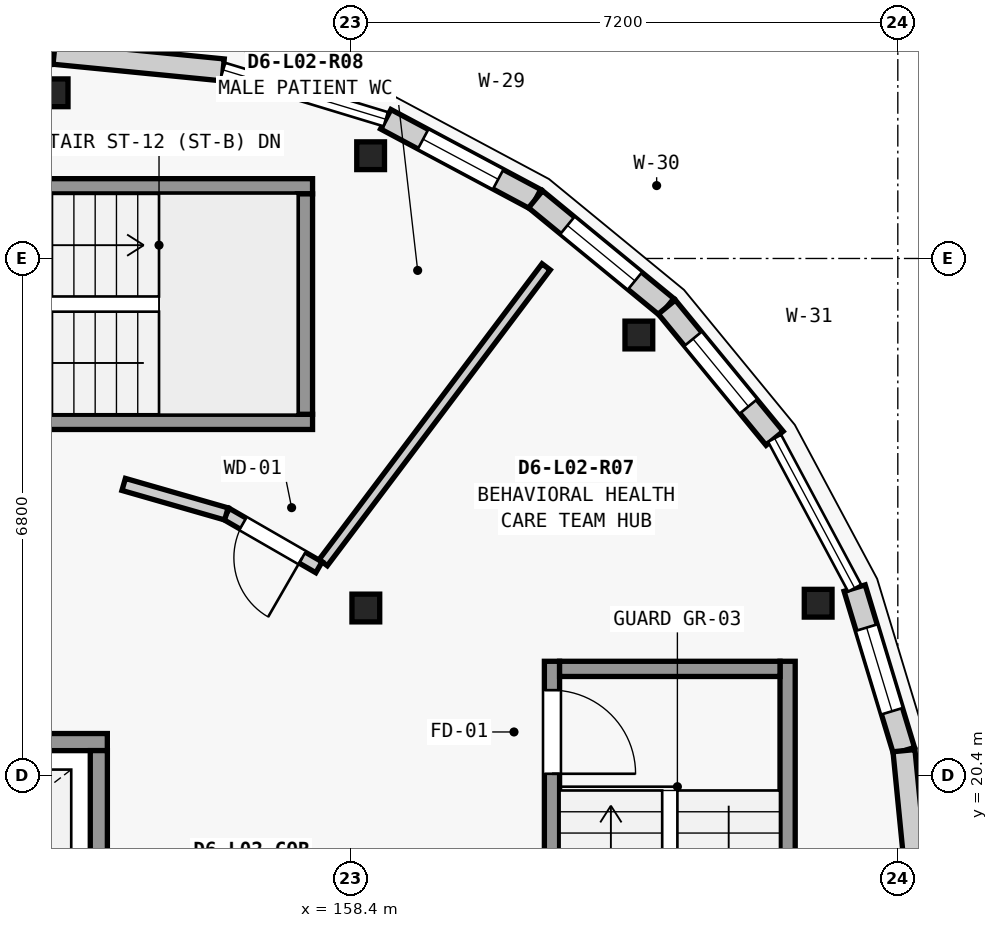
"""IFC4 building model, lengths in metres.
Left out: names, types, materials, properties, quantities, classifications, styles, units other than length and angle.
Written with IfcOpenShell. Run it as: python <this file> out.ifc"""

import sys

from ifc_helpers import new_model, si_unit, direction, frame, frame_2d, origin, origin_2d, place, context, subcontext, project, spatial, rectangle, extrude, element, fill, save


model = new_model("IFC4")
c1 = context("Model", 3, precision=1e-05, world=origin(), true_north=direction((0.0, 1.0)))
c2 = subcontext(c1, "Body", "Model", "MODEL_VIEW")
j1 = project(units=[si_unit("LENGTHUNIT", "METRE"), si_unit("PLANEANGLEUNIT", "RADIAN")], contexts=[c1])
p1 = place(None, origin())
s1 = spatial("IfcSite", under=j1, at=p1, CompositionType="ELEMENT")
p2 = place(p1, origin())
s2 = spatial("IfcBuilding", under=s1, at=p2, CompositionType="ELEMENT")
p3 = place(p2, frame((0.0, 0.0, 8.75)))
s3 = spatial("IfcBuildingStorey", under=s2, at=p3, CompositionType="ELEMENT", Elevation=8.75)
for number, where, z_axis, x_axis in (
    (1, (164.552, 22.664, 0.0), (0.0, 0.0, 1.0), (1.0, 0.0, 0.0)),
    (2, (162.193, 26.193, 0.0), (0.0, 0.0, 1.0), (1.0, 0.0, 0.0)),
    (3, (158.664, 28.552, 0.0), (0.0, 0.0, 1.0), (1.0, 0.0, 0.0)),
    (4, (154.5, 29.38, 0.0), (0.0, 0.0, 1.0), (1.0, 0.0, 0.0)),
    (5, (158.601, 22.601, 0.0), (0.0, 0.0, 1.0), (1.0, 0.0, 0.0)),
):
    element("IfcColumn", number, at=place(p3, frame(where, z_axis=z_axis, x_axis=x_axis)), inside=s3, PredefinedType="COLUMN", context=c2, shape_type="SweptSolid", body=[
        extrude(rectangle(XDim=0.365, YDim=0.365, at=origin_2d()), origin(), (0.0, 0.0, 1.0), 4.2),
    ])
for number, where, z_axis, x_axis in (
    (6, (152.276, 29.681, 0.0), (0.0, 0.0, 1.0), (0.995, 0.098, 0.0)),
    (7, (154.5, 29.9, 0.0), (0.0, 0.0, 1.0), (0.995, -0.098, 0.0)),
):
    element("IfcWall", number, at=place(p3, frame(where, z_axis=z_axis, x_axis=x_axis)), inside=s3, PredefinedType="ELEMENTEDWALL", context=c2, shape_type="SweptSolid", body=[
        extrude(rectangle(XDim=2.235, YDim=0.29, at=frame_2d((1.117, 0.0))), origin(), (0.0, 0.0, 1.0), 3.314),
    ])
p4 = place(p3, frame((158.863, 29.032, 0.0), z_axis=(0.0, 0.0, 1.0), x_axis=(0.882017012185, -0.471217561446, 0.0)))
e8 = element("IfcWall", 8, at=p4, inside=s3, PredefinedType="ELEMENTEDWALL", context=c2, shape_type="SweptSolid", body=[
    extrude(rectangle(XDim=2.235, YDim=0.29, at=frame_2d((1.117, 0.0))), origin(), (0.0, 0.0, 1.0), 3.314),
])
p5 = place(p4, frame((0.557, 0.0, 0.85)))
e9 = element("IfcOpeningElement", 9, at=p5, cuts=e8, PredefinedType="OPENING", context=c2, shape_type="SweptSolid", body=[
    extrude(rectangle(XDim=1.12, YDim=1.65, at=frame_2d((0.56, 0.825))), frame((0.0, 0.155, 0.0), z_axis=(0.0, -1.0, 0.0), x_axis=(1.0, 0.0, 0.0)), (0.0, 0.0, 1.0), 0.31),
])
p6 = place(p3, frame((160.834, 27.979, 0.0), z_axis=(0.0, 0.0, 1.0), x_axis=(0.772875513354, -0.63455767339, 0.0)))
e10 = element("IfcWall", 10, at=p6, inside=s3, PredefinedType="ELEMENTEDWALL", context=c2, shape_type="SweptSolid", body=[
    extrude(rectangle(XDim=2.235, YDim=0.29, at=frame_2d((1.117, 0.0))), origin(), (0.0, 0.0, 1.0), 3.314),
])
p7 = place(p6, frame((0.542, 0.0, 0.85)))
e11 = element("IfcOpeningElement", 11, at=p7, cuts=e10, PredefinedType="OPENING", context=c2, shape_type="SweptSolid", body=[
    extrude(rectangle(XDim=1.15, YDim=1.4, at=frame_2d((0.575, 0.7))), frame((0.0, 0.155, 0.0), z_axis=(0.0, -1.0, 0.0), x_axis=(1.0, 0.0, 0.0)), (0.0, 0.0, 1.0), 0.31),
])
p8 = place(p3, frame((162.561, 26.561, 0.0), z_axis=(0.0, 0.0, 1.0), x_axis=(0.63455767339, -0.772875513354, 0.0)))
e12 = element("IfcWall", 12, at=p8, inside=s3, PredefinedType="ELEMENTEDWALL", context=c2, shape_type="SweptSolid", body=[
    extrude(rectangle(XDim=2.235, YDim=0.29, at=frame_2d((1.117, 0.0))), origin(), (0.0, 0.0, 1.0), 3.314),
])
p9 = place(p8, frame((0.542, 0.0, 0.85)))
e13 = element("IfcOpeningElement", 13, at=p9, cuts=e12, PredefinedType="OPENING", context=c2, shape_type="SweptSolid", body=[
    extrude(rectangle(XDim=1.15, YDim=1.7, at=frame_2d((0.575, 0.85))), frame((0.0, 0.155, 0.0), z_axis=(0.0, -1.0, 0.0), x_axis=(1.0, 0.0, 0.0)), (0.0, 0.0, 1.0), 0.31),
])
p10 = place(p3, frame((165.032, 22.863, 0.0), z_axis=(0.0, 0.0, 1.0), x_axis=(0.290322655883, -0.956928814218, 0.0)))
e14 = element("IfcWall", 14, at=p10, inside=s3, PredefinedType="ELEMENTEDWALL", context=c2, shape_type="SweptSolid", body=[
    extrude(rectangle(XDim=2.235, YDim=0.29, at=frame_2d((1.118, 0.0))), origin(), (0.0, 0.0, 1.0), 3.314),
])
p11 = place(p10, frame((0.543, 0.0, 0.85)))
e15 = element("IfcOpeningElement", 15, at=p11, cuts=e14, PredefinedType="OPENING", context=c2, shape_type="SweptSolid", body=[
    extrude(rectangle(XDim=1.15, YDim=2.0, at=frame_2d((0.575, 1.0))), frame((0.0, 0.155, 0.0), z_axis=(0.0, -1.0, 0.0), x_axis=(1.0, 0.0, 0.0)), (0.0, 0.0, 1.0), 0.31),
])
p12 = place(p3, frame((165.681, 20.724, 0.0), z_axis=(0.0, 0.0, 1.0), x_axis=(0.097989369151, -0.995187461503, 0.0)))
e16 = element("IfcWall", 16, at=p12, inside=s3, PredefinedType="ELEMENTEDWALL", context=c2, shape_type="SweptSolid", body=[
    extrude(rectangle(XDim=2.235, YDim=0.29, at=frame_2d((1.117, 0.0))), origin(), (0.0, 0.0, 1.0), 3.314),
])
p13 = place(p3, frame((161.05, 21.9, 0.0), z_axis=(0.0, 0.0, 1.0), x_axis=(0.0, -1.0, 0.0)))
e17 = element("IfcWall", 17, at=p13, inside=s3, PredefinedType="SHEAR", context=c2, shape_type="SweptSolid", body=[
    extrude(rectangle(XDim=6.8, YDim=0.2, at=frame_2d((3.4, 0.0))), origin(), (0.0, 0.0, 1.0), 3.96),
])
p14 = place(p13, frame((0.38, 0.0, 0.0)))
e18 = element("IfcOpeningElement", 18, at=p14, cuts=e17, PredefinedType="OPENING", context=c2, shape_type="SweptSolid", body=[
    extrude(rectangle(XDim=1.1, YDim=2.15, at=frame_2d((0.55, 1.075))), frame((0.0, 0.11, 0.0), z_axis=(0.0, -1.0, 0.0), x_axis=(1.0, 0.0, 0.0)), (0.0, 0.0, 1.0), 0.22),
])
p15 = place(p3, frame((164.15, 21.9, 0.0), z_axis=(0.0, 0.0, 1.0), x_axis=(0.0, -1.0, 0.0)))
e19 = element("IfcWall", 19, at=p15, inside=s3, PredefinedType="SHEAR", context=c2, shape_type="SweptSolid", body=[
    extrude(rectangle(XDim=6.8, YDim=0.2, at=frame_2d((3.4, 0.0))), origin(), (0.0, 0.0, 1.0), 3.96),
])
p16 = place(p3, frame((161.15, 21.8, 0.0), z_axis=(0.0, 0.0, 1.0), x_axis=(1.0, 0.0, 0.0)))
e20 = element("IfcWall", 20, at=p16, inside=s3, PredefinedType="SHEAR", context=c2, shape_type="SweptSolid", body=[
    extrude(rectangle(XDim=2.9, YDim=0.2, at=frame_2d((1.45, 0.0))), origin(), (0.0, 0.0, 1.0), 3.96),
])
p17 = place(p3, frame((151.1, 25.05, 0.0), z_axis=(0.0, 0.0, 1.0), x_axis=(1.0, 0.0, 0.0)))
e21 = element("IfcWall", 21, at=p17, inside=s3, PredefinedType="SHEAR", context=c2, shape_type="SweptSolid", body=[
    extrude(rectangle(XDim=6.8, YDim=0.2, at=frame_2d((3.4, 0.0))), origin(), (0.0, 0.0, 1.0), 3.96),
])
p18 = place(p17, frame((0.38, 0.0, 0.0)))
e22 = element("IfcOpeningElement", 22, at=p18, cuts=e21, PredefinedType="OPENING", context=c2, shape_type="SweptSolid", body=[
    extrude(rectangle(XDim=1.1, YDim=2.15, at=frame_2d((0.55, 1.075))), frame((0.0, 0.11, 0.0), z_axis=(0.0, -1.0, 0.0), x_axis=(1.0, 0.0, 0.0)), (0.0, 0.0, 1.0), 0.22),
])
p19 = place(p3, frame((151.1, 28.15, 0.0), z_axis=(0.0, 0.0, 1.0), x_axis=(1.0, 0.0, 0.0)))
e23 = element("IfcWall", 23, at=p19, inside=s3, PredefinedType="SHEAR", context=c2, shape_type="SweptSolid", body=[
    extrude(rectangle(XDim=6.8, YDim=0.2, at=frame_2d((3.4, 0.0))), origin(), (0.0, 0.0, 1.0), 3.96),
])
p20 = place(p3, frame((157.8, 25.15, 0.0), z_axis=(0.0, 0.0, 1.0), x_axis=(0.0, 1.0, 0.0)))
e24 = element("IfcWall", 24, at=p20, inside=s3, PredefinedType="SHEAR", context=c2, shape_type="SweptSolid", body=[
    extrude(rectangle(XDim=2.9, YDim=0.2, at=frame_2d((1.45, 0.0))), origin(), (0.0, 0.0, 1.0), 3.96),
])
p21 = place(p3, frame((152.1, 20.837, 0.0), z_axis=(0.0, 0.0, 1.0), x_axis=(1.0, 0.0, 0.0)))
e25 = element("IfcWall", 25, at=p21, inside=s3, PredefinedType="SHEAR", context=c2, shape_type="SweptSolid", body=[
    extrude(rectangle(XDim=3.1, YDim=0.225, at=frame_2d((1.55, 0.0))), origin(), (0.0, 0.0, 1.0), 3.96),
])
p22 = place(p3, frame((155.088, 18.575, 0.0), z_axis=(0.0, 0.0, 1.0), x_axis=(0.0, 1.0, 0.0)))
e26 = element("IfcWall", 26, at=p22, inside=s3, PredefinedType="SHEAR", context=c2, shape_type="SweptSolid", body=[
    extrude(rectangle(XDim=2.15, YDim=0.225, at=frame_2d((1.075, 0.0))), origin(), (0.0, 0.0, 1.0), 3.96),
])
p23 = place(p3, frame((158.04, 23.198, 0.0), z_axis=(0.0, 0.0, 1.0), x_axis=(0.601809953338, 0.798639330401, 0.0)))
e27 = element("IfcWall", 27, at=p23, inside=s3, PredefinedType="PLUMBINGWALL", context=c2, shape_type="SweptSolid", body=[
    extrude(rectangle(XDim=4.873, YDim=0.135, at=frame_2d((2.437, 0.0))), origin(), (0.0, 0.0, 1.0), 3.279),
])
p24 = place(p3, frame((157.984, 23.137, 0.0), z_axis=(0.0, 0.0, 1.0), x_axis=(-0.866312781502, 0.499501916519, 0.0)))
e28 = element("IfcWall", 28, at=p24, inside=s3, PredefinedType="PARTITIONING", context=c2, shape_type="SweptSolid", body=[
    extrude(rectangle(XDim=1.406, YDim=0.165, at=frame_2d((0.703, 0.0))), origin(), (0.0, 0.0, 1.0), 3.279),
])
p25 = place(p24, frame((0.253, 0.0, 0.0)))
e29 = element("IfcOpeningElement", 29, at=p25, cuts=e28, PredefinedType="OPENING", context=c2, shape_type="SweptSolid", body=[
    extrude(rectangle(XDim=0.9, YDim=2.1, at=frame_2d((0.45, 1.05))), frame((0.0, 0.093, 0.0), z_axis=(0.0, -1.0, 0.0), x_axis=(1.0, 0.0, 0.0)), (0.0, 0.0, 1.0), 0.185),
])
p26 = place(p3, frame((156.766, 23.839, 0.0), z_axis=(0.0, 0.0, 1.0), x_axis=(-0.961162645401, 0.27598255214, 0.0)))
e30 = element("IfcWall", 30, at=p26, inside=s3, PredefinedType="PARTITIONING", context=c2, shape_type="SweptSolid", body=[
    extrude(rectangle(XDim=1.406, YDim=0.165, at=frame_2d((0.703, 0.0))), origin(), (0.0, 0.0, 1.0), 3.279),
])
p27 = place(p5, origin())
e31 = element("IfcWindow", 31, at=p27, inside=s3, PartitioningType="SINGLE_PANEL", PredefinedType="WINDOW", context=c2, shape_type="SweptSolid", body=[
    extrude(rectangle(XDim=1.12, YDim=1.65, at=frame_2d((0.56, 0.825))), frame((0.0, 0.03, 0.0), z_axis=(0.0, -1.0, 0.0), x_axis=(1.0, 0.0, 0.0)), (0.0, 0.0, 1.0), 0.06),
])
fill(e9, e31)
p28 = place(p7, origin())
e32 = element("IfcWindow", 32, at=p28, inside=s3, PartitioningType="SINGLE_PANEL", PredefinedType="WINDOW", context=c2, shape_type="SweptSolid", body=[
    extrude(rectangle(XDim=1.15, YDim=1.4, at=frame_2d((0.575, 0.7))), frame((0.0, 0.03, 0.0), z_axis=(0.0, -1.0, 0.0), x_axis=(1.0, 0.0, 0.0)), (0.0, 0.0, 1.0), 0.06),
])
fill(e11, e32)
p29 = place(p9, origin())
e33 = element("IfcWindow", 33, at=p29, inside=s3, PartitioningType="SINGLE_PANEL", PredefinedType="WINDOW", context=c2, shape_type="SweptSolid", body=[
    extrude(rectangle(XDim=1.15, YDim=1.7, at=frame_2d((0.575, 0.85))), frame((0.0, 0.03, 0.0), z_axis=(0.0, -1.0, 0.0), x_axis=(1.0, 0.0, 0.0)), (0.0, 0.0, 1.0), 0.06),
])
fill(e13, e33)
p30 = place(p11, origin())
e34 = element("IfcWindow", 34, at=p30, inside=s3, PartitioningType="SINGLE_PANEL", PredefinedType="WINDOW", context=c2, shape_type="SweptSolid", body=[
    extrude(rectangle(XDim=1.15, YDim=2.0, at=frame_2d((0.575, 1.0))), frame((0.0, 0.03, 0.0), z_axis=(0.0, -1.0, 0.0), x_axis=(1.0, 0.0, 0.0)), (0.0, 0.0, 1.0), 0.06),
])
fill(e15, e34)
p31 = place(p14, origin())
e35 = element("IfcDoor", 35, at=p31, inside=s3, OperationType="SINGLE_SWING_RIGHT", PredefinedType="DOOR", context=c2, shape_type="SweptSolid", body=[
    extrude(rectangle(XDim=1.1, YDim=2.15, at=frame_2d((0.55, 1.075))), frame((0.0, 0.025, 0.0), z_axis=(0.0, -1.0, 0.0), x_axis=(1.0, 0.0, 0.0)), (0.0, 0.0, 1.0), 0.05),
])
fill(e18, e35)
p32 = place(p25, origin())
e36 = element("IfcDoor", 36, at=p32, inside=s3, OperationType="SINGLE_SWING_LEFT", PredefinedType="DOOR", context=c2, shape_type="SweptSolid", body=[
    extrude(rectangle(XDim=0.9, YDim=2.1, at=frame_2d((0.45, 1.05))), frame((0.0, 0.025, 0.0), z_axis=(0.0, -1.0, 0.0), x_axis=(1.0, 0.0, 0.0)), (0.0, 0.0, 1.0), 0.05),
])
fill(e29, e36)
save(model, sys.argv[1])
